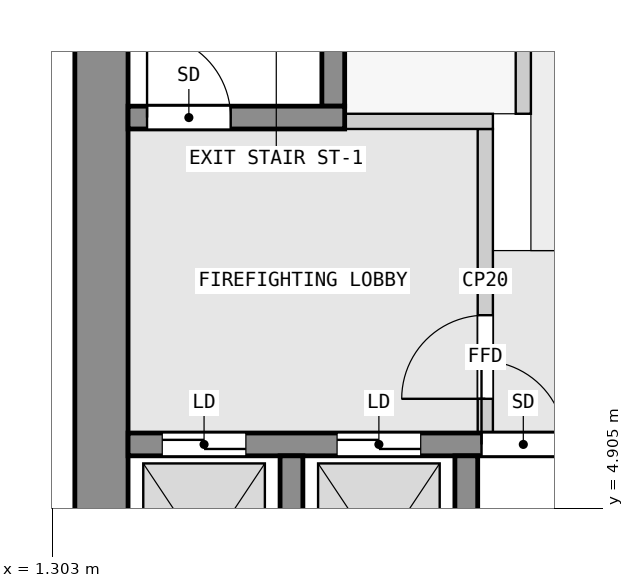
"""IFC4 building model, lengths in metres.
Left out: names, types, materials, properties, quantities, classifications, styles, units other than length and angle.
Written with IfcOpenShell. Run it as: python <this file> out.ifc"""

import sys

from ifc_helpers import new_model, si_unit, direction, frame, frame_2d, origin, place, context, subcontext, project, spatial, rectangle, extrude, element, fill, save


model = new_model("IFC4")
c1 = context("Model", 3, precision=1e-05, world=origin(), true_north=direction((0.0, 1.0)))
c2 = subcontext(c1, "Body", "Model", "MODEL_VIEW")
j1 = project(units=[si_unit("LENGTHUNIT", "METRE"), si_unit("PLANEANGLEUNIT", "RADIAN")], contexts=[c1])
p1 = place(None, origin())
s1 = spatial("IfcSite", under=j1, at=p1, CompositionType="ELEMENT")
p2 = place(p1, origin())
s2 = spatial("IfcBuilding", under=s1, at=p2, CompositionType="ELEMENT")
p3 = place(p2, frame((0.0, 0.0, 95.8)))
s3 = spatial("IfcBuildingStorey", under=s2, at=p3, CompositionType="ELEMENT", Elevation=95.8)
p4 = place(p3, frame((1.95, 2.5, 0.0), z_axis=(0.0, 0.0, 1.0), x_axis=(0.0, 1.0, 0.0)))
e1 = element("IfcWall", 1, at=p4, inside=s3, PredefinedType="SHEAR", context=c2, shape_type="SweptSolid", body=[
    extrude(rectangle(XDim=14.8, YDim=0.7, at=frame_2d((7.4, 0.0))), origin(), (0.0, 0.0, 1.0), 3.25),
])
for number, where, z_axis, x_axis in (
    (2, (4.45, 2.8, 0.0), (0.0, 0.0, 1.0), (0.0, 1.0, 0.0)),
    (3, (6.75, 2.8, 0.0), (0.0, 0.0, 1.0), (0.0, 1.0, 0.0)),
):
    element("IfcWall", number, at=place(p3, frame(where, z_axis=z_axis, x_axis=x_axis)), inside=s3, PredefinedType="SHEAR", context=c2, shape_type="SweptSolid", body=[
        extrude(rectangle(XDim=2.8, YDim=0.3, at=frame_2d((1.4, 0.0))), origin(), (0.0, 0.0, 1.0), 3.25),
    ])
p5 = place(p3, frame((2.3, 5.75, 0.0), z_axis=(0.0, 0.0, 1.0), x_axis=(1.0, 0.0, 0.0)))
e4 = element("IfcWall", 4, at=p5, inside=s3, PredefinedType="SHEAR", context=c2, shape_type="SweptSolid", body=[
    extrude(rectangle(XDim=18.8, YDim=0.3, at=frame_2d((9.4, 0.0))), origin(), (0.0, 0.0, 1.0), 3.25),
])
p6 = place(p5, frame((4.65, 0.0, 0.0)))
e5 = element("IfcOpeningElement", 5, at=p6, cuts=e4, PredefinedType="OPENING", context=c2, shape_type="SweptSolid", body=[
    extrude(rectangle(XDim=1.1, YDim=2.1, at=frame_2d((0.55, 1.05))), frame((0.0, 0.16, 0.0), z_axis=(0.0, -1.0, 0.0), x_axis=(1.0, 0.0, 0.0)), (0.0, 0.0, 1.0), 0.32),
])
p7 = place(p5, frame((0.45, 0.0, 0.0)))
e6 = element("IfcOpeningElement", 6, at=p7, cuts=e4, PredefinedType="OPENING", context=c2, shape_type="SweptSolid", body=[
    extrude(rectangle(XDim=1.1, YDim=2.1, at=frame_2d((0.55, 1.05))), frame((0.0, 0.16, 0.0), z_axis=(0.0, -1.0, 0.0), x_axis=(1.0, 0.0, 0.0)), (0.0, 0.0, 1.0), 0.32),
])
p8 = place(p5, frame((2.75, 0.0, 0.0)))
e7 = element("IfcOpeningElement", 7, at=p8, cuts=e4, PredefinedType="OPENING", context=c2, shape_type="SweptSolid", body=[
    extrude(rectangle(XDim=1.1, YDim=2.1, at=frame_2d((0.55, 1.05))), frame((0.0, 0.16, 0.0), z_axis=(0.0, -1.0, 0.0), x_axis=(1.0, 0.0, 0.0)), (0.0, 0.0, 1.0), 0.32),
])
p9 = place(p5, frame((11.85, 0.0, 0.0)))
e8 = element("IfcOpeningElement", 8, at=p9, cuts=e4, PredefinedType="OPENING", context=c2, shape_type="SweptSolid", body=[
    extrude(rectangle(XDim=1.1, YDim=2.1, at=frame_2d((0.55, 1.05))), frame((0.0, 0.16, 0.0), z_axis=(0.0, -1.0, 0.0), x_axis=(1.0, 0.0, 0.0)), (0.0, 0.0, 1.0), 0.32),
])
p10 = place(p5, frame((14.35, 0.0, 0.0)))
e9 = element("IfcOpeningElement", 9, at=p10, cuts=e4, PredefinedType="OPENING", context=c2, shape_type="SweptSolid", body=[
    extrude(rectangle(XDim=1.1, YDim=2.1, at=frame_2d((0.55, 1.05))), frame((0.0, 0.16, 0.0), z_axis=(0.0, -1.0, 0.0), x_axis=(1.0, 0.0, 0.0)), (0.0, 0.0, 1.0), 0.32),
])
p11 = place(p5, frame((16.85, 0.0, 0.0)))
e10 = element("IfcOpeningElement", 10, at=p11, cuts=e4, PredefinedType="OPENING", context=c2, shape_type="SweptSolid", body=[
    extrude(rectangle(XDim=1.1, YDim=2.1, at=frame_2d((0.55, 1.05))), frame((0.0, 0.16, 0.0), z_axis=(0.0, -1.0, 0.0), x_axis=(1.0, 0.0, 0.0)), (0.0, 0.0, 1.0), 0.32),
])
p12 = place(p3, frame((2.3, 10.05, 0.0), z_axis=(0.0, 0.0, 1.0), x_axis=(1.0, 0.0, 0.0)))
e11 = element("IfcWall", 11, at=p12, inside=s3, PredefinedType="SHEAR", context=c2, shape_type="SweptSolid", body=[
    extrude(rectangle(XDim=2.85, YDim=0.3, at=frame_2d((1.425, 0.0))), origin(), (0.0, 0.0, 1.0), 3.25),
])
p13 = place(p12, frame((0.25, 0.0, 0.0)))
e12 = element("IfcOpeningElement", 12, at=p13, cuts=e11, PredefinedType="OPENING", context=c2, shape_type="SweptSolid", body=[
    extrude(rectangle(XDim=1.1, YDim=2.1, at=frame_2d((0.55, 1.05))), frame((0.0, 0.16, 0.0), z_axis=(0.0, -1.0, 0.0), x_axis=(1.0, 0.0, 0.0)), (0.0, 0.0, 1.0), 0.32),
])
p14 = place(p3, frame((5.0, 10.2, 0.0), z_axis=(0.0, 0.0, 1.0), x_axis=(0.0, 1.0, 0.0)))
e13 = element("IfcWall", 13, at=p14, inside=s3, PredefinedType="SHEAR", context=c2, shape_type="SweptSolid", body=[
    extrude(rectangle(XDim=6.4, YDim=0.3, at=frame_2d((3.2, 0.0))), origin(), (0.0, 0.0, 1.0), 3.25),
])
p15 = place(p3, frame((7.0, 5.9, 0.0), z_axis=(0.0, 0.0, 1.0), x_axis=(0.0, 1.0, 0.0)))
e14 = element("IfcWall", 14, at=p15, inside=s3, PredefinedType="PARTITIONING", context=c2, shape_type="SweptSolid", body=[
    extrude(rectangle(XDim=4.0, YDim=0.2, at=frame_2d((2.0, 0.0))), origin(), (0.0, 0.0, 1.0), 3.25),
])
p16 = place(p15, frame((0.45, 0.0, 0.0)))
e15 = element("IfcOpeningElement", 15, at=p16, cuts=e14, PredefinedType="OPENING", context=c2, shape_type="SweptSolid", body=[
    extrude(rectangle(XDim=1.1, YDim=2.1, at=frame_2d((0.55, 1.05))), frame((0.0, 0.11, 0.0), z_axis=(0.0, -1.0, 0.0), x_axis=(1.0, 0.0, 0.0)), (0.0, 0.0, 1.0), 0.22),
])
p17 = place(p3, frame((5.15, 10.0, 0.0), z_axis=(0.0, 0.0, 1.0), x_axis=(1.0, 0.0, 0.0)))
e16 = element("IfcWall", 16, at=p17, inside=s3, PredefinedType="PARTITIONING", context=c2, shape_type="SweptSolid", body=[
    extrude(rectangle(XDim=1.95, YDim=0.2, at=frame_2d((0.975, 0.0))), origin(), (0.0, 0.0, 1.0), 3.25),
])
p18 = place(p3, frame((7.5, 10.1, 0.0), z_axis=(0.0, 0.0, 1.0), x_axis=(0.0, 1.0, 0.0)))
e17 = element("IfcWall", 17, at=p18, inside=s3, PredefinedType="PARTITIONING", context=c2, shape_type="SweptSolid", body=[
    extrude(rectangle(XDim=7.2, YDim=0.2, at=frame_2d((3.6, 0.0))), origin(), (0.0, 0.0, 1.0), 3.25),
])
p19 = place(p18, frame((1.05, 0.0, 0.0)))
e18 = element("IfcOpeningElement", 18, at=p19, cuts=e17, PredefinedType="OPENING", context=c2, shape_type="SweptSolid", body=[
    extrude(rectangle(XDim=0.9, YDim=2.1, at=frame_2d((0.45, 1.05))), frame((0.0, 0.11, 0.0), z_axis=(0.0, -1.0, 0.0), x_axis=(1.0, 0.0, 0.0)), (0.0, 0.0, 1.0), 0.22),
])
p20 = place(p18, frame((4.65, 0.0, 0.0)))
e19 = element("IfcOpeningElement", 19, at=p20, cuts=e17, PredefinedType="OPENING", context=c2, shape_type="SweptSolid", body=[
    extrude(rectangle(XDim=0.9, YDim=2.1, at=frame_2d((0.45, 1.05))), frame((0.0, 0.11, 0.0), z_axis=(0.0, -1.0, 0.0), x_axis=(1.0, 0.0, 0.0)), (0.0, 0.0, 1.0), 0.22),
])
p21 = place(p16, origin())
e20 = element("IfcDoor", 20, at=p21, inside=s3, OperationType="SINGLE_SWING_LEFT", PredefinedType="DOOR", context=c2, shape_type="SweptSolid", body=[
    extrude(rectangle(XDim=1.1, YDim=2.1, at=frame_2d((0.55, 1.05))), frame((0.0, 0.025, 0.0), z_axis=(0.0, -1.0, 0.0), x_axis=(1.0, 0.0, 0.0)), (0.0, 0.0, 1.0), 0.05),
])
fill(e15, e20)
p22 = place(p13, origin())
e21 = element("IfcDoor", 21, at=p22, inside=s3, OperationType="SINGLE_SWING_RIGHT", PredefinedType="DOOR", context=c2, shape_type="SweptSolid", body=[
    extrude(rectangle(XDim=1.1, YDim=2.1, at=frame_2d((0.55, 1.05))), frame((0.0, 0.025, 0.0), z_axis=(0.0, -1.0, 0.0), x_axis=(1.0, 0.0, 0.0)), (0.0, 0.0, 1.0), 0.05),
])
fill(e12, e21)
p23 = place(p6, origin())
e22 = element("IfcDoor", 22, at=p23, inside=s3, OperationType="SINGLE_SWING_LEFT", PredefinedType="DOOR", context=c2, shape_type="SweptSolid", body=[
    extrude(rectangle(XDim=1.1, YDim=2.1, at=frame_2d((0.55, 1.05))), frame((0.0, 0.025, 0.0), z_axis=(0.0, -1.0, 0.0), x_axis=(1.0, 0.0, 0.0)), (0.0, 0.0, 1.0), 0.05),
])
fill(e5, e22)
p24 = place(p7, origin())
e23 = element("IfcDoor", 23, at=p24, inside=s3, OperationType="DOUBLE_DOOR_SLIDING", PredefinedType="DOOR", context=c2, shape_type="SweptSolid", body=[
    extrude(rectangle(XDim=1.1, YDim=2.1, at=frame_2d((0.55, 1.05))), frame((0.0, 0.025, 0.0), z_axis=(0.0, -1.0, 0.0), x_axis=(1.0, 0.0, 0.0)), (0.0, 0.0, 1.0), 0.05),
])
fill(e6, e23)
p25 = place(p8, origin())
e24 = element("IfcDoor", 24, at=p25, inside=s3, OperationType="DOUBLE_DOOR_SLIDING", PredefinedType="DOOR", context=c2, shape_type="SweptSolid", body=[
    extrude(rectangle(XDim=1.1, YDim=2.1, at=frame_2d((0.55, 1.05))), frame((0.0, 0.025, 0.0), z_axis=(0.0, -1.0, 0.0), x_axis=(1.0, 0.0, 0.0)), (0.0, 0.0, 1.0), 0.05),
])
fill(e7, e24)
save(model, sys.argv[1])
